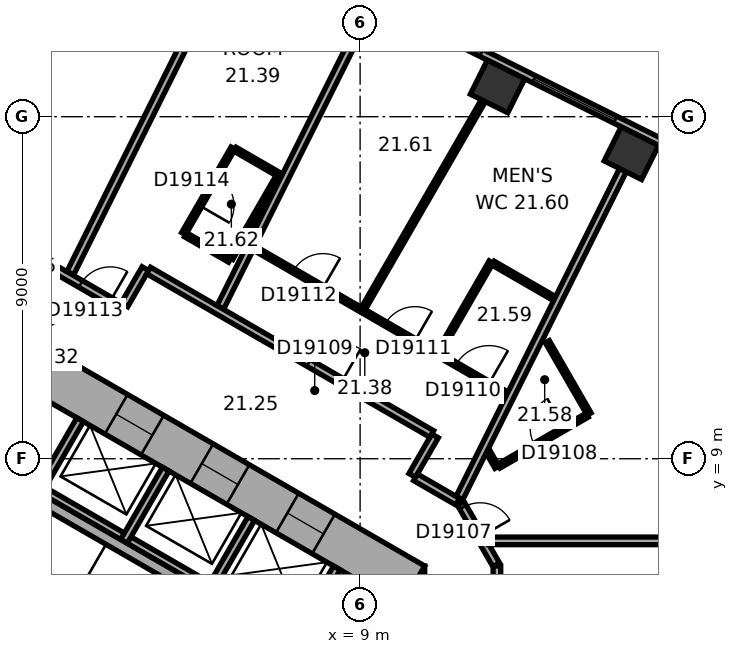
"""IFC4 building model, lengths in metres.
Left out: names, types, materials, properties, quantities, classifications, styles, units other than length and angle.
Written with IfcOpenShell. Run it as: python <this file> out.ifc"""

import sys

from ifc_helpers import new_model, si_unit, direction, frame, frame_2d, origin, origin_2d, place, context, subcontext, project, spatial, rectangle, extrude, element, fill, save


model = new_model("IFC4")
c1 = context("Model", 3, precision=1e-05, world=origin(), true_north=direction((0.0, 1.0)))
c2 = subcontext(c1, "Body", "Model", "MODEL_VIEW")
j1 = project(units=[si_unit("LENGTHUNIT", "METRE"), si_unit("PLANEANGLEUNIT", "RADIAN")], contexts=[c1])
p1 = place(None, origin())
s1 = spatial("IfcSite", under=j1, at=p1, CompositionType="ELEMENT")
p2 = place(p1, origin())
s2 = spatial("IfcBuilding", under=s1, at=p2, CompositionType="ELEMENT")
p3 = place(p2, frame((0.0, 0.0, 93.5)))
s3 = spatial("IfcBuildingStorey", under=s2, at=p3, CompositionType="ELEMENT", Elevation=93.5)
for number, where, z_axis, x_axis in (
    (1, (16.138, 17.04, 0.0), (0.0, 0.0, 1.0), (-0.895, 0.446, 0.0)),
    (2, (12.616, 18.795, 0.0), (0.0, 0.0, 1.0), (-0.895, 0.446, 0.0)),
):
    element("IfcColumn", number, at=place(p3, frame(where, z_axis=z_axis, x_axis=x_axis)), inside=s3, PredefinedType="COLUMN", context=c2, shape_type="SweptSolid", body=[
        extrude(rectangle(XDim=1.1, YDim=1.0, at=origin_2d()), origin(), (0.0, 0.0, 1.0), 3.3),
    ])
p4 = place(p3, frame((10.1, -6.177, 0.0), z_axis=(0.0, 0.0, 1.0), x_axis=(0.0, 1.0, 0.0)))
e3 = element("IfcWall", 3, at=p4, inside=s3, PredefinedType="SHEAR", context=c2, shape_type="SweptSolid", body=[
    extrude(rectangle(XDim=12.355, YDim=1.2, at=frame_2d((6.177, 0.0))), origin(), (0.0, 0.0, 1.0), 3.3),
])
p5 = place(p4, frame((6.378, 0.0, 0.0)))
e4 = element("IfcOpeningElement", 4, at=p5, cuts=e3, PredefinedType="OPENING", context=c2, shape_type="SweptSolid", body=[
    extrude(rectangle(XDim=1.5, YDim=2.1, at=frame_2d((0.75, 1.05))), frame((0.0, 0.61, 0.0), z_axis=(0.0, -1.0, 0.0), x_axis=(1.0, 0.0, 0.0)), (0.0, 0.0, 1.0), 1.22),
])
p6 = place(p4, frame((1.828, 0.0, 0.0)))
e5 = element("IfcOpeningElement", 5, at=p6, cuts=e3, PredefinedType="OPENING", context=c2, shape_type="SweptSolid", body=[
    extrude(rectangle(XDim=1.1, YDim=2.1, at=frame_2d((0.55, 1.05))), frame((0.0, 0.61, 0.0), z_axis=(0.0, -1.0, 0.0), x_axis=(1.0, 0.0, 0.0)), (0.0, 0.0, 1.0), 1.22),
])
p7 = place(p4, frame((4.427, 0.0, 0.0)))
e6 = element("IfcOpeningElement", 6, at=p7, cuts=e3, PredefinedType="OPENING", context=c2, shape_type="SweptSolid", body=[
    extrude(rectangle(XDim=1.1, YDim=2.1, at=frame_2d((0.55, 1.05))), frame((0.0, 0.61, 0.0), z_axis=(0.0, -1.0, 0.0), x_axis=(1.0, 0.0, 0.0)), (0.0, 0.0, 1.0), 1.22),
])
p8 = place(p3, frame((10.4, 5.658, 0.0), z_axis=(0.0, 0.0, 1.0), x_axis=(-0.866021384402, 0.500006961711, 0.0)))
e7 = element("IfcWall", 7, at=p8, inside=s3, PredefinedType="SHEAR", context=c2, shape_type="SweptSolid", body=[
    extrude(rectangle(XDim=12.355, YDim=1.2, at=frame_2d((6.178, 0.0))), origin(), (0.0, 0.0, 1.0), 3.3),
])
p9 = place(p8, frame((2.728, 0.0, 0.0)))
e8 = element("IfcOpeningElement", 8, at=p9, cuts=e7, PredefinedType="OPENING", context=c2, shape_type="SweptSolid", body=[
    extrude(rectangle(XDim=1.1, YDim=2.1, at=frame_2d((0.55, 1.05))), frame((0.0, 0.61, 0.0), z_axis=(0.0, -1.0, 0.0), x_axis=(1.0, 0.0, 0.0)), (0.0, 0.0, 1.0), 1.22),
])
p10 = place(p8, frame((5.328, 0.0, 0.0)))
e9 = element("IfcOpeningElement", 9, at=p10, cuts=e7, PredefinedType="OPENING", context=c2, shape_type="SweptSolid", body=[
    extrude(rectangle(XDim=1.1, YDim=2.1, at=frame_2d((0.55, 1.05))), frame((0.0, 0.61, 0.0), z_axis=(0.0, -1.0, 0.0), x_axis=(1.0, 0.0, 0.0)), (0.0, 0.0, 1.0), 1.22),
])
p11 = place(p8, frame((7.928, 0.0, 0.0)))
e10 = element("IfcOpeningElement", 10, at=p11, cuts=e7, PredefinedType="OPENING", context=c2, shape_type="SweptSolid", body=[
    extrude(rectangle(XDim=1.1, YDim=2.1, at=frame_2d((0.55, 1.05))), frame((0.0, 0.61, 0.0), z_axis=(0.0, -1.0, 0.0), x_axis=(1.0, 0.0, 0.0)), (0.0, 0.0, 1.0), 1.22),
])
p12 = place(p3, frame((20.63, 15.47, 0.0), z_axis=(0.0, 0.0, 1.0), x_axis=(-0.894934518609, 0.446197498203, 0.0)))
e11 = element("IfcWall", 11, at=p12, inside=s3, PredefinedType="STANDARD", context=c2, shape_type="SweptSolid", body=[
    extrude(rectangle(XDim=21.246, YDim=0.2, at=frame_2d((10.623, 0.0))), origin(), (0.0, 0.0, 1.0), 3.3),
])
p13 = place(p12, frame((1.553, 0.0, 0.8)))
e12 = element("IfcOpeningElement", 12, at=p13, cuts=e11, PredefinedType="OPENING", context=c2, shape_type="SweptSolid", body=[
    extrude(rectangle(XDim=2.4, YDim=1.7, at=frame_2d((1.2, 0.85))), frame((0.0, 0.11, 0.0), z_axis=(0.0, -1.0, 0.0), x_axis=(1.0, 0.0, 0.0)), (0.0, 0.0, 1.0), 0.22),
])
p14 = place(p12, frame((5.488, 0.0, 0.8)))
e13 = element("IfcOpeningElement", 13, at=p14, cuts=e11, PredefinedType="OPENING", context=c2, shape_type="SweptSolid", body=[
    extrude(rectangle(XDim=2.4, YDim=1.7, at=frame_2d((1.2, 0.85))), frame((0.0, 0.11, 0.0), z_axis=(0.0, -1.0, 0.0), x_axis=(1.0, 0.0, 0.0)), (0.0, 0.0, 1.0), 0.22),
])
p15 = place(p12, frame((9.422, 0.0, 0.8)))
e14 = element("IfcOpeningElement", 14, at=p15, cuts=e11, PredefinedType="OPENING", context=c2, shape_type="SweptSolid", body=[
    extrude(rectangle(XDim=2.4, YDim=1.7, at=frame_2d((1.2, 0.85))), frame((0.0, 0.11, 0.0), z_axis=(0.0, -1.0, 0.0), x_axis=(1.0, 0.0, 0.0)), (0.0, 0.0, 1.0), 0.22),
])
p16 = place(p12, frame((13.357, 0.0, 0.8)))
e15 = element("IfcOpeningElement", 15, at=p16, cuts=e11, PredefinedType="OPENING", context=c2, shape_type="SweptSolid", body=[
    extrude(rectangle(XDim=2.4, YDim=1.7, at=frame_2d((1.2, 0.85))), frame((0.0, 0.11, 0.0), z_axis=(0.0, -1.0, 0.0), x_axis=(1.0, 0.0, 0.0)), (0.0, 0.0, 1.0), 0.22),
])
p17 = place(p12, frame((17.292, 0.0, 0.8)))
e16 = element("IfcOpeningElement", 16, at=p17, cuts=e11, PredefinedType="OPENING", context=c2, shape_type="SweptSolid", body=[
    extrude(rectangle(XDim=2.4, YDim=1.7, at=frame_2d((1.2, 0.85))), frame((0.0, 0.11, 0.0), z_axis=(0.0, -1.0, 0.0), x_axis=(1.0, 0.0, 0.0)), (0.0, 0.0, 1.0), 0.22),
])
p18 = place(p3, frame((7.424, 4.259, 0.0), z_axis=(0.0, 0.0, 1.0), x_axis=(-0.866026010844, 0.49999894854, 0.0)))
e17 = element("IfcWall", 17, at=p18, inside=s3, PredefinedType="PARTITIONING", context=c2, shape_type="SweptSolid", body=[
    extrude(rectangle(XDim=8.0, YDim=0.2, at=frame_2d((4.0, 0.0))), origin(), (0.0, 0.0, 1.0), 3.05),
])
for number, where, z_axis, x_axis in (
    (18, (7.287, 4.222, 0.0), (0.0, 0.0, 1.0), (0.5, 0.866, 0.0)),
    (19, (5.036, 5.522, 0.0), (0.0, 0.0, 1.0), (0.5, 0.866, 0.0)),
    (20, (2.784, 6.822, 0.0), (0.0, 0.0, 1.0), (0.5, 0.866, 0.0)),
    (21, (0.532, 8.122, 0.0), (0.0, 0.0, 1.0), (0.5, 0.866, 0.0)),
):
    element("IfcWall", number, at=place(p3, frame(where, z_axis=z_axis, x_axis=x_axis)), inside=s3, PredefinedType="PARTITIONING", context=c2, shape_type="SweptSolid", body=[
        extrude(rectangle(XDim=2.2, YDim=0.2, at=frame_2d((1.1, 0.0))), origin(), (0.0, 0.0, 1.0), 3.05),
    ])
p19 = place(p3, frame((6.303, 4.617, 0.0), z_axis=(0.0, 0.0, 1.0), x_axis=(-0.866027801685, 0.499995846692, 0.0)))
e22 = element("IfcWall", 22, at=p19, inside=s3, PredefinedType="SHEAR", context=c2, shape_type="SweptSolid", body=[
    extrude(rectangle(XDim=7.06, YDim=0.3, at=frame_2d((3.53, 0.0))), origin(), (0.0, 0.0, 1.0), 3.05),
])
p20 = place(p3, frame((0.95, 14.001, 0.0), z_axis=(0.0, 0.0, 1.0), x_axis=(-1.0, 0.0, 0.0)))
e23 = element("IfcWall", 23, at=p20, inside=s3, PredefinedType="PARTITIONING", context=c2, shape_type="SweptSolid", body=[
    extrude(rectangle(XDim=1.86, YDim=0.2, at=frame_2d((0.93, 0.0))), origin(), (0.0, 0.0, 1.0), 3.05),
])
p21 = place(p20, frame((0.48, 0.0, 0.0)))
e24 = element("IfcOpeningElement", 24, at=p21, cuts=e23, PredefinedType="OPENING", context=c2, shape_type="SweptSolid", body=[
    extrude(rectangle(XDim=0.9, YDim=2.1, at=frame_2d((0.45, 1.05))), frame((0.0, 0.11, 0.0), z_axis=(0.0, -1.0, 0.0), x_axis=(1.0, 0.0, 0.0)), (0.0, 0.0, 1.0), 0.22),
])
p22 = place(p3, frame((2.748, 12.962, 0.0), z_axis=(0.0, 0.0, 1.0), x_axis=(-0.866013897511, 0.50001992892, 0.0)))
e25 = element("IfcWall", 25, at=p22, inside=s3, PredefinedType="PARTITIONING", context=c2, shape_type="SweptSolid", body=[
    extrude(rectangle(XDim=2.037, YDim=0.2, at=frame_2d((1.018, 0.0))), origin(), (0.0, 0.0, 1.0), 3.05),
])
p23 = place(p22, frame((0.372, 0.0, 0.0)))
e26 = element("IfcOpeningElement", 26, at=p23, cuts=e25, PredefinedType="OPENING", context=c2, shape_type="SweptSolid", body=[
    extrude(rectangle(XDim=0.9, YDim=2.1, at=frame_2d((0.45, 1.05))), frame((0.0, 0.11, 0.0), z_axis=(0.0, -1.0, 0.0), x_axis=(1.0, 0.0, 0.0)), (0.0, 0.0, 1.0), 0.22),
])
p24 = place(p3, frame((3.349, 14.002, 0.0), z_axis=(0.0, 0.0, 1.0), x_axis=(-0.500074377092, -0.865982457891, 0.0)))
e27 = element("IfcWall", 27, at=p24, inside=s3, PredefinedType="PARTITIONING", context=c2, shape_type="SweptSolid", body=[
    extrude(rectangle(XDim=1.101, YDim=0.2, at=frame_2d((0.55, 0.0))), origin(), (0.0, 0.0, 1.0), 3.05),
])
p25 = place(p3, frame((4.356, 14.922, 0.0), z_axis=(0.0, 0.0, 1.0), x_axis=(0.499936506574, 0.866062058628, 0.0)))
e28 = element("IfcWall", 28, at=p25, inside=s3, PredefinedType="PARTITIONING", context=c2, shape_type="SweptSolid", body=[
    extrude(rectangle(XDim=2.6, YDim=0.12, at=frame_2d((1.3, 0.0))), origin(), (0.0, 0.0, 1.0), 3.05),
])
p26 = place(p25, frame((0.85, 0.0, 0.0)))
e29 = element("IfcOpeningElement", 29, at=p26, cuts=e28, PredefinedType="OPENING", context=c2, shape_type="SweptSolid", body=[
    extrude(rectangle(XDim=0.9, YDim=2.1, at=frame_2d((0.45, 1.05))), frame((0.0, 0.07, 0.0), z_axis=(0.0, -1.0, 0.0), x_axis=(1.0, 0.0, 0.0)), (0.0, 0.0, 1.0), 0.14),
])
p27 = place(p3, frame((5.351, 21.859, 0.0), z_axis=(0.0, 0.0, 1.0), x_axis=(-0.446205309328, -0.894930624086, 0.0)))
e30 = element("IfcWall", 30, at=p27, inside=s3, PredefinedType="PARTITIONING", context=c2, shape_type="SweptSolid", body=[
    extrude(rectangle(XDim=8.913, YDim=0.2, at=frame_2d((4.457, 0.0))), origin(), (0.0, 0.0, 1.0), 2.6),
])
p28 = place(p3, frame((5.569, 14.222, 0.0), z_axis=(0.0, 0.0, 1.0), x_axis=(-0.866036909293, 0.499980071345, 0.0)))
e31 = element("IfcWall", 31, at=p28, inside=s3, PredefinedType="PARTITIONING", context=c2, shape_type="SweptSolid", body=[
    extrude(rectangle(XDim=1.34, YDim=0.12, at=frame_2d((0.67, 0.0))), origin(), (0.0, 0.0, 1.0), 3.05),
])
p29 = place(p3, frame((5.708, 17.144, 0.0), z_axis=(0.0, 0.0, 1.0), x_axis=(0.866082447003, -0.499901185229, 0.0)))
e32 = element("IfcWall", 32, at=p29, inside=s3, PredefinedType="PARTITIONING", context=c2, shape_type="SweptSolid", body=[
    extrude(rectangle(XDim=1.34, YDim=0.12, at=frame_2d((0.67, 0.0))), origin(), (0.0, 0.0, 1.0), 3.05),
])
p30 = place(p3, frame((6.839, 16.422, 0.0), z_axis=(0.0, 0.0, 1.0), x_axis=(-0.50000366821, -0.866023285932, 0.0)))
e33 = element("IfcWall", 33, at=p30, inside=s3, PredefinedType="PARTITIONING", context=c2, shape_type="SweptSolid", body=[
    extrude(rectangle(XDim=2.48, YDim=0.12, at=frame_2d((1.24, 0.0))), origin(), (0.0, 0.0, 1.0), 3.05),
])
p31 = place(p3, frame((8.872, 20.104, 0.0), z_axis=(0.0, 0.0, 1.0), x_axis=(-0.446218378653, -0.894924107706, 0.0)))
e34 = element("IfcWall", 34, at=p31, inside=s3, PredefinedType="PARTITIONING", context=c2, shape_type="SweptSolid", body=[
    extrude(rectangle(XDim=7.95, YDim=0.2, at=frame_2d((3.975, 0.0))), origin(), (0.0, 0.0, 1.0), 3.05),
])
p32 = place(p3, frame((10.371, 8.561, 0.0), z_axis=(0.0, 0.0, 1.0), x_axis=(0.499986357472, 0.866033280158, 0.0)))
e35 = element("IfcWall", 35, at=p32, inside=s3, PredefinedType="PARTITIONING", context=c2, shape_type="SweptSolid", body=[
    extrude(rectangle(XDim=1.201, YDim=0.2, at=frame_2d((0.601, 0.0))), origin(), (0.0, 0.0, 1.0), 3.05),
])
p33 = place(p3, frame((10.885, 9.652, 0.0), z_axis=(0.0, 0.0, 1.0), x_axis=(-0.866033868542, 0.499985338323, 0.0)))
e36 = element("IfcWall", 36, at=p33, inside=s3, PredefinedType="PARTITIONING", context=c2, shape_type="SweptSolid", body=[
    extrude(rectangle(XDim=8.602, YDim=0.2, at=frame_2d((4.301, 0.0))), origin(), (0.0, 0.0, 1.0), 3.05),
])
p34 = place(p33, frame((2.739, 0.0, 0.0)))
e37 = element("IfcOpeningElement", 37, at=p34, cuts=e36, PredefinedType="OPENING", context=c2, shape_type="SweptSolid", body=[
    extrude(rectangle(XDim=1.0, YDim=2.1, at=frame_2d((0.5, 1.05))), frame((0.0, 0.11, 0.0), z_axis=(0.0, -1.0, 0.0), x_axis=(1.0, 0.0, 0.0)), (0.0, 0.0, 1.0), 0.22),
])
p35 = place(p3, frame((11.566, 7.871, 0.0), z_axis=(0.0, 0.0, 1.0), x_axis=(-0.866004557827, 0.500036104519, 0.0)))
e38 = element("IfcWall", 38, at=p35, inside=s3, PredefinedType="PARTITIONING", context=c2, shape_type="SweptSolid", body=[
    extrude(rectangle(XDim=1.28, YDim=0.2, at=frame_2d((0.64, 0.0))), origin(), (0.0, 0.0, 1.0), 3.05),
])
p36 = place(p3, frame((12.243, 18.423, 0.0), z_axis=(0.0, 0.0, 1.0), x_axis=(-0.499993523031, -0.866029143232, 0.0)))
e39 = element("IfcWall", 39, at=p36, inside=s3, PredefinedType="PARTITIONING", context=c2, shape_type="SweptSolid", body=[
    extrude(rectangle(XDim=6.315, YDim=0.12, at=frame_2d((3.157, 0.0))), origin(), (0.0, 0.0, 1.0), 2.6),
])
p37 = place(p3, frame((12.448, 14.177, 0.0), z_axis=(0.0, 0.0, 1.0), x_axis=(-0.500048966069, -0.865997131366, 0.0)))
e40 = element("IfcWall", 40, at=p37, inside=s3, PredefinedType="PARTITIONING", context=c2, shape_type="SweptSolid", body=[
    extrude(rectangle(XDim=2.74, YDim=0.12, at=frame_2d((1.37, 0.0))), origin(), (0.0, 0.0, 1.0), 3.05),
])
p38 = place(p3, frame((12.58, 6.212, 0.0), z_axis=(0.0, 0.0, 1.0), x_axis=(-0.500063286585, 0.865988862174, 0.0)))
e41 = element("IfcWall", 41, at=p38, inside=s3, PredefinedType="PARTITIONING", context=c2, shape_type="SweptSolid", body=[
    extrude(rectangle(XDim=1.86, YDim=0.2, at=frame_2d((0.93, 0.0))), origin(), (0.0, 0.0, 1.0), 3.05),
])
p39 = place(p38, frame((0.842, 0.0, 0.0)))
e42 = element("IfcOpeningElement", 42, at=p39, cuts=e41, PredefinedType="OPENING", context=c2, shape_type="SweptSolid", body=[
    extrude(rectangle(XDim=0.9, YDim=2.1, at=frame_2d((0.45, 1.05))), frame((0.0, 0.11, 0.0), z_axis=(0.0, -1.0, 0.0), x_axis=(1.0, 0.0, 0.0)), (0.0, 0.0, 1.0), 0.22),
])
p40 = place(p3, frame((12.6, 3.004, 0.0), z_axis=(0.0, 0.0, 1.0), x_axis=(0.0, 1.0, 0.0)))
e43 = element("IfcWall", 43, at=p40, inside=s3, PredefinedType="PARTITIONING", context=c2, shape_type="SweptSolid", body=[
    extrude(rectangle(XDim=3.173, YDim=0.2, at=frame_2d((1.586, 0.0))), origin(), (0.0, 0.0, 1.0), 3.05),
])
p41 = place(p40, frame((1.998, 0.0, 0.0)))
e44 = element("IfcOpeningElement", 44, at=p41, cuts=e43, PredefinedType="OPENING", context=c2, shape_type="SweptSolid", body=[
    extrude(rectangle(XDim=0.9, YDim=2.1, at=frame_2d((0.45, 1.05))), frame((0.0, 0.11, 0.0), z_axis=(0.0, -1.0, 0.0), x_axis=(1.0, 0.0, 0.0)), (0.0, 0.0, 1.0), 0.22),
])
p42 = place(p3, frame((12.601, 8.776, 0.0), z_axis=(0.0, 0.0, 1.0), x_axis=(-0.500166486798, 0.865929261247, 0.0)))
e45 = element("IfcWall", 45, at=p42, inside=s3, PredefinedType="PARTITIONING", context=c2, shape_type="SweptSolid", body=[
    extrude(rectangle(XDim=0.476, YDim=0.12, at=frame_2d((0.238, 0.0))), origin(), (0.0, 0.0, 1.0), 3.05),
])
p43 = place(p3, frame((12.866, 10.702, 0.0), z_axis=(0.0, 0.0, 1.0), x_axis=(-0.866023151433, 0.500003901167, 0.0)))
e46 = element("IfcWall", 46, at=p43, inside=s3, PredefinedType="PARTITIONING", context=c2, shape_type="SweptSolid", body=[
    extrude(rectangle(XDim=7.684, YDim=0.12, at=frame_2d((3.842, 0.0))), origin(), (0.0, 0.0, 1.0), 3.05),
])
p44 = place(p43, frame((0.55, 0.0, 0.0)))
e47 = element("IfcOpeningElement", 47, at=p44, cuts=e46, PredefinedType="OPENING", context=c2, shape_type="SweptSolid", body=[
    extrude(rectangle(XDim=1.0, YDim=2.1, at=frame_2d((0.5, 1.05))), frame((0.0, 0.07, 0.0), z_axis=(0.0, -1.0, 0.0), x_axis=(1.0, 0.0, 0.0)), (0.0, 0.0, 1.0), 0.14),
])
p45 = place(p43, frame((2.8, 0.0, 0.0)))
e48 = element("IfcOpeningElement", 48, at=p45, cuts=e46, PredefinedType="OPENING", context=c2, shape_type="SweptSolid", body=[
    extrude(rectangle(XDim=0.9, YDim=2.1, at=frame_2d((0.45, 1.05))), frame((0.0, 0.07, 0.0), z_axis=(0.0, -1.0, 0.0), x_axis=(1.0, 0.0, 0.0)), (0.0, 0.0, 1.0), 0.14),
])
p46 = place(p43, frame((5.592, 0.0, 0.0)))
e49 = element("IfcOpeningElement", 49, at=p46, cuts=e46, PredefinedType="OPENING", context=c2, shape_type="SweptSolid", body=[
    extrude(rectangle(XDim=0.9, YDim=2.1, at=frame_2d((0.45, 1.05))), frame((0.0, 0.07, 0.0), z_axis=(0.0, -1.0, 0.0), x_axis=(1.0, 0.0, 0.0)), (0.0, 0.0, 1.0), 0.14),
])
p47 = place(p3, frame((13.926, 12.081, 0.0), z_axis=(0.0, 0.0, 1.0), x_axis=(0.499994660107, -0.866028486751, 0.0)))
e50 = element("IfcWall", 50, at=p47, inside=s3, PredefinedType="PARTITIONING", context=c2, shape_type="SweptSolid", body=[
    extrude(rectangle(XDim=2.2, YDim=0.12, at=frame_2d((1.1, 0.0))), origin(), (0.0, 0.0, 1.0), 3.05),
])
p48 = place(p3, frame((14.118, 13.212, 0.0), z_axis=(0.0, 0.0, 1.0), x_axis=(-0.866039825209, 0.499975020527, 0.0)))
e51 = element("IfcWall", 51, at=p48, inside=s3, PredefinedType="PARTITIONING", context=c2, shape_type="SweptSolid", body=[
    extrude(rectangle(XDim=1.869, YDim=0.12, at=frame_2d((0.934, 0.0))), origin(), (0.0, 0.0, 1.0), 3.05),
])
p49 = place(p3, frame((14.974, 10.146, 0.0), z_axis=(0.0, 0.0, 1.0), x_axis=(-0.86599746015, -0.500048396672, 0.0)))
e52 = element("IfcWall", 52, at=p49, inside=s3, PredefinedType="PARTITIONING", context=c2, shape_type="SweptSolid", body=[
    extrude(rectangle(XDim=2.68, YDim=0.12, at=frame_2d((1.34, 0.0))), origin(), (0.0, 0.0, 1.0), 3.05),
])
p50 = place(p49, frame((0.69, 0.0, 0.0)))
e53 = element("IfcOpeningElement", 53, at=p50, cuts=e52, PredefinedType="OPENING", context=c2, shape_type="SweptSolid", body=[
    extrude(rectangle(XDim=0.9, YDim=2.1, at=frame_2d((0.45, 1.05))), frame((0.0, 0.07, 0.0), z_axis=(0.0, -1.0, 0.0), x_axis=(1.0, 0.0, 0.0)), (0.0, 0.0, 1.0), 0.14),
])
p51 = place(p3, frame((15.915, 16.592, 0.0), z_axis=(0.0, 0.0, 1.0), x_axis=(-0.446199736347, -0.894933402709, 0.0)))
e54 = element("IfcWall", 54, at=p51, inside=s3, PredefinedType="PARTITIONING", context=c2, shape_type="SweptSolid", body=[
    extrude(rectangle(XDim=9.635, YDim=0.2, at=frame_2d((4.817, 0.0))), origin(), (0.0, 0.0, 1.0), 3.05),
])
p52 = place(p3, frame((21.95, 6.839, 0.0), z_axis=(0.0, 0.0, 1.0), x_axis=(-1.0, 0.0, 0.0)))
e55 = element("IfcWall", 55, at=p52, inside=s3, PredefinedType="PARTITIONING", context=c2, shape_type="SweptSolid", body=[
    extrude(rectangle(XDim=9.572, YDim=0.2, at=frame_2d((4.786, 0.0))), origin(), (0.0, 0.0, 1.0), 3.05),
])
p53 = place(p14, origin())
e56 = element("IfcWindow", 56, at=p53, inside=s3, PartitioningType="SINGLE_PANEL", PredefinedType="WINDOW", context=c2, shape_type="SweptSolid", body=[
    extrude(rectangle(XDim=2.4, YDim=1.7, at=frame_2d((1.2, 0.85))), frame((0.0, 0.03, 0.0), z_axis=(0.0, -1.0, 0.0), x_axis=(1.0, 0.0, 0.0)), (0.0, 0.0, 1.0), 0.06),
])
fill(e13, e56)
p54 = place(p15, origin())
e57 = element("IfcWindow", 57, at=p54, inside=s3, PartitioningType="SINGLE_PANEL", PredefinedType="WINDOW", context=c2, shape_type="SweptSolid", body=[
    extrude(rectangle(XDim=2.4, YDim=1.7, at=frame_2d((1.2, 0.85))), frame((0.0, 0.03, 0.0), z_axis=(0.0, -1.0, 0.0), x_axis=(1.0, 0.0, 0.0)), (0.0, 0.0, 1.0), 0.06),
])
fill(e14, e57)
p55 = place(p9, origin())
e58 = element("IfcDoor", 58, at=p55, inside=s3, OperationType="DOUBLE_DOOR_SLIDING", PredefinedType="DOOR", context=c2, shape_type="SweptSolid", body=[
    extrude(rectangle(XDim=1.1, YDim=2.1, at=frame_2d((0.55, 1.05))), frame((0.0, 0.025, 0.0), z_axis=(0.0, -1.0, 0.0), x_axis=(1.0, 0.0, 0.0)), (0.0, 0.0, 1.0), 0.05),
])
fill(e8, e58)
p56 = place(p10, origin())
e59 = element("IfcDoor", 59, at=p56, inside=s3, OperationType="DOUBLE_DOOR_SLIDING", PredefinedType="DOOR", context=c2, shape_type="SweptSolid", body=[
    extrude(rectangle(XDim=1.1, YDim=2.1, at=frame_2d((0.55, 1.05))), frame((0.0, 0.025, 0.0), z_axis=(0.0, -1.0, 0.0), x_axis=(1.0, 0.0, 0.0)), (0.0, 0.0, 1.0), 0.05),
])
fill(e9, e59)
p57 = place(p11, origin())
e60 = element("IfcDoor", 60, at=p57, inside=s3, OperationType="DOUBLE_DOOR_SLIDING", PredefinedType="DOOR", context=c2, shape_type="SweptSolid", body=[
    extrude(rectangle(XDim=1.1, YDim=2.1, at=frame_2d((0.55, 1.05))), frame((0.0, 0.025, 0.0), z_axis=(0.0, -1.0, 0.0), x_axis=(1.0, 0.0, 0.0)), (0.0, 0.0, 1.0), 0.05),
])
fill(e10, e60)
p58 = place(p39, origin())
e61 = element("IfcDoor", 61, at=p58, inside=s3, OperationType="SINGLE_SWING_LEFT", PredefinedType="DOOR", context=c2, shape_type="SweptSolid", body=[
    extrude(rectangle(XDim=0.9, YDim=2.1, at=frame_2d((0.45, 1.05))), frame((0.0, 0.025, 0.0), z_axis=(0.0, -1.0, 0.0), x_axis=(1.0, 0.0, 0.0)), (0.0, 0.0, 1.0), 0.05),
])
fill(e42, e61)
p59 = place(p50, origin())
e62 = element("IfcDoor", 62, at=p59, inside=s3, OperationType="SINGLE_SWING_LEFT", PredefinedType="DOOR", context=c2, shape_type="SweptSolid", body=[
    extrude(rectangle(XDim=0.9, YDim=2.1, at=frame_2d((0.45, 1.05))), frame((0.0, 0.025, 0.0), z_axis=(0.0, -1.0, 0.0), x_axis=(1.0, 0.0, 0.0)), (0.0, 0.0, 1.0), 0.05),
])
fill(e53, e62)
p60 = place(p34, origin())
e63 = element("IfcDoor", 63, at=p60, inside=s3, OperationType="SINGLE_SWING_LEFT", PredefinedType="DOOR", context=c2, shape_type="SweptSolid", body=[
    extrude(rectangle(XDim=1.0, YDim=2.1, at=frame_2d((0.5, 1.05))), frame((0.0, 0.025, 0.0), z_axis=(0.0, -1.0, 0.0), x_axis=(1.0, 0.0, 0.0)), (0.0, 0.0, 1.0), 0.05),
])
fill(e37, e63)
p61 = place(p44, origin())
e64 = element("IfcDoor", 64, at=p61, inside=s3, OperationType="SINGLE_SWING_LEFT", PredefinedType="DOOR", context=c2, shape_type="SweptSolid", body=[
    extrude(rectangle(XDim=1.0, YDim=2.1, at=frame_2d((0.5, 1.05))), frame((0.0, 0.025, 0.0), z_axis=(0.0, -1.0, 0.0), x_axis=(1.0, 0.0, 0.0)), (0.0, 0.0, 1.0), 0.05),
])
fill(e47, e64)
p62 = place(p45, origin())
e65 = element("IfcDoor", 65, at=p62, inside=s3, OperationType="SINGLE_SWING_LEFT", PredefinedType="DOOR", context=c2, shape_type="SweptSolid", body=[
    extrude(rectangle(XDim=0.9, YDim=2.1, at=frame_2d((0.45, 1.05))), frame((0.0, 0.025, 0.0), z_axis=(0.0, -1.0, 0.0), x_axis=(1.0, 0.0, 0.0)), (0.0, 0.0, 1.0), 0.05),
])
fill(e48, e65)
p63 = place(p46, origin())
e66 = element("IfcDoor", 66, at=p63, inside=s3, OperationType="SINGLE_SWING_LEFT", PredefinedType="DOOR", context=c2, shape_type="SweptSolid", body=[
    extrude(rectangle(XDim=0.9, YDim=2.1, at=frame_2d((0.45, 1.05))), frame((0.0, 0.025, 0.0), z_axis=(0.0, -1.0, 0.0), x_axis=(1.0, 0.0, 0.0)), (0.0, 0.0, 1.0), 0.05),
])
fill(e49, e66)
p64 = place(p23, origin())
e67 = element("IfcDoor", 67, at=p64, inside=s3, OperationType="SINGLE_SWING_LEFT", PredefinedType="DOOR", context=c2, shape_type="SweptSolid", body=[
    extrude(rectangle(XDim=0.9, YDim=2.1, at=frame_2d((0.45, 1.05))), frame((0.0, 0.025, 0.0), z_axis=(0.0, -1.0, 0.0), x_axis=(1.0, 0.0, 0.0)), (0.0, 0.0, 1.0), 0.05),
])
fill(e26, e67)
p65 = place(p26, origin())
e68 = element("IfcDoor", 68, at=p65, inside=s3, OperationType="SINGLE_SWING_LEFT", PredefinedType="DOOR", context=c2, shape_type="SweptSolid", body=[
    extrude(rectangle(XDim=0.9, YDim=2.1, at=frame_2d((0.45, 1.05))), frame((0.0, 0.025, 0.0), z_axis=(0.0, -1.0, 0.0), x_axis=(1.0, 0.0, 0.0)), (0.0, 0.0, 1.0), 0.05),
])
fill(e29, e68)
save(model, sys.argv[1])
